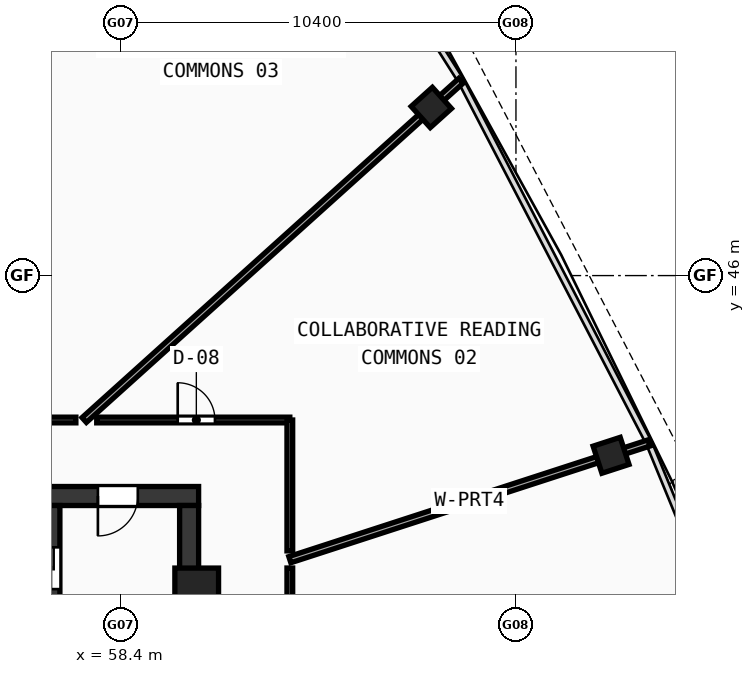
"""IFC4 building model, lengths in metres.
Left out: names, types, materials, properties, quantities, classifications, styles, units other than length and angle.
Written with IfcOpenShell. Run it as: python <this file> out.ifc"""

import sys

from ifc_helpers import new_model, si_unit, direction, frame, frame_2d, origin, origin_with_axes, origin_2d, place, context, subcontext, project, spatial, rectangle, hollow_rectangle, extrude, source, transform, mapped, element, fill, save


model = new_model("IFC4")
c1 = context("Model", 3, precision=1e-05, world=origin(), true_north=direction((0.0, 1.0)))
c2 = subcontext(c1, "Body", "Model", "MODEL_VIEW")
j1 = project(units=[si_unit("LENGTHUNIT", "METRE"), si_unit("PLANEANGLEUNIT", "RADIAN")], contexts=[c1])
p1 = place(None, origin())
s1 = spatial("IfcSite", under=j1, at=p1, CompositionType="ELEMENT")
p2 = place(p1, origin())
s2 = spatial("IfcBuilding", under=s1, at=p2, CompositionType="ELEMENT")
p3 = place(p2, frame((0.0, 0.0, 311.13)))
s3 = spatial("IfcBuildingStorey", under=s2, at=p3, CompositionType="ELEMENT", Elevation=311.13)
p4 = place(p3, frame((49.2, 40.2, 0.0), z_axis=(0.0, 0.0, 1.0), x_axis=(1.0, 0.0, 0.0)))
e1 = element("IfcWall", 1, at=p4, inside=s3, PredefinedType="SHEAR", context=c2, shape_type="SweptSolid", body=[
    extrude(rectangle(XDim=11.25, YDim=0.5, at=frame_2d((5.625, 0.0))), origin(), (0.0, 0.0, 1.0), 3.47),
])
p5 = place(p4, frame((8.6, 0.0, 0.0)))
e2 = element("IfcOpeningElement", 2, at=p5, cuts=e1, PredefinedType="OPENING", context=c2, shape_type="SweptSolid", body=[
    extrude(rectangle(XDim=1.05, YDim=2.1, at=frame_2d((0.525, 1.05))), frame((0.0, 0.26, 0.0), z_axis=(0.0, -1.0, 0.0), x_axis=(1.0, 0.0, 0.0)), (0.0, 0.0, 1.0), 0.52),
])
p6 = place(p3, frame((60.2, 27.75, 0.0), z_axis=(0.0, 0.0, 1.0), x_axis=(0.0, 1.0, 0.0)))
e3 = element("IfcWall", 3, at=p6, inside=s3, PredefinedType="SHEAR", context=c2, shape_type="SweptSolid", body=[
    extrude(rectangle(XDim=12.2, YDim=0.5, at=frame_2d((6.1, 0.0))), origin(), (0.0, 0.0, 1.0), 3.47),
])
p7 = place(p3, frame((56.6, 27.75, 0.0), z_axis=(0.0, 0.0, 1.0), x_axis=(0.0, 1.0, 0.0)))
e4 = element("IfcWall", 4, at=p7, inside=s3, PredefinedType="SHEAR", context=c2, shape_type="SweptSolid", body=[
    extrude(rectangle(XDim=12.2, YDim=0.4, at=frame_2d((6.1, 0.0))), origin(), (0.0, 0.0, 1.0), 3.47),
])
p8 = place(p7, frame((10.0, 0.0, 0.0)))
e5 = element("IfcOpeningElement", 5, at=p8, cuts=e4, PredefinedType="OPENING", context=c2, shape_type="SweptSolid", body=[
    extrude(rectangle(XDim=1.1, YDim=2.1, at=frame_2d((0.55, 1.05))), frame((0.0, 0.21, 0.0), z_axis=(0.0, -1.0, 0.0), x_axis=(1.0, 0.0, 0.0)), (0.0, 0.0, 1.0), 0.42),
])
m1 = source(origin(), c2, "Body", "SweptSolid", [
    extrude(hollow_rectangle(XDim=1.15, YDim=1.15, WallThickness=0.048, at=origin_2d()), origin(), (0.0, 0.0, 1.0), 3.73),
])
p9 = place(p3, frame((60.4, 37.729, -0.26), z_axis=(0.0, 0.0, 1.0), x_axis=(1.0, 0.0, 0.0)))
e6 = element("IfcColumn", 6, at=p9, inside=s3, PredefinedType="COLUMN", context=c2, shape_type="MappedRepresentation", body=[
    mapped(m1, transform((0.0, 0.0, 0.0), scale=1.0)),
])
m2 = source(origin(), c2, "Body", "SweptSolid", [
    extrude(hollow_rectangle(XDim=0.75, YDim=0.75, WallThickness=0.028, at=origin_2d()), origin(), (0.0, 0.0, 1.0), 3.73),
])
for number, where, z_axis, x_axis in (
    (7, (71.302, 41.271, -0.26), (0.0, 0.0, 1.0), (-0.309, 0.951, 0.0)),
    (8, (66.573, 50.424, -0.26), (0.0, 0.0, 1.0), (-0.669, 0.743, 0.0)),
):
    element("IfcColumn", number, at=place(p3, frame(where, z_axis=z_axis, x_axis=x_axis)), inside=s3, PredefinedType="COLUMN", context=c2, shape_type="MappedRepresentation", body=[
        mapped(m2, transform((0.0, 0.0, 0.0), scale=1.0)),
    ])
p10 = place(p3, frame((62.85, 38.525, 0.0), z_axis=(0.0, 0.0, 1.0), x_axis=(0.951056273407, 0.309017741906, 0.0)))
e9 = element("IfcWall", 9, at=p10, inside=s3, PredefinedType="PARTITIONING", context=c2, shape_type="SweptSolid", body=[
    extrude(rectangle(XDim=9.937, YDim=0.17, at=frame_2d((4.969, 0.0))), origin(), (0.0, 0.0, 1.0), 2.87),
])
p11 = place(p3, frame((57.44, 42.2, 0.0), z_axis=(0.0, 0.0, 1.0), x_axis=(0.743143971996, 0.669131554245, 0.0)))
e10 = element("IfcWall", 10, at=p11, inside=s3, PredefinedType="PARTITIONING", context=c2, shape_type="SweptSolid", body=[
    extrude(rectangle(XDim=13.34, YDim=0.17, at=frame_2d((6.67, 0.0))), origin(), (0.0, 0.0, 1.0), 2.87),
])
p12 = place(p3, frame((53.387, 45.8, 0.0), z_axis=(0.0, 0.0, 1.0), x_axis=(0.406746244391, 0.913541182801, 0.0)))
e11 = element("IfcWall", 11, at=p12, inside=s3, PredefinedType="PARTITIONING", context=c2, shape_type="SweptSolid", body=[
    extrude(rectangle(XDim=17.589, YDim=0.17, at=frame_2d((8.794, 0.0))), origin(), (0.0, 0.0, 1.0), 2.87),
])
p13 = place(p3, frame((54.42, 42.2, 0.0), z_axis=(0.0, 0.0, 1.0), x_axis=(1.0, 0.0, 0.0)))
e12 = element("IfcWall", 12, at=p13, inside=s3, PredefinedType="PARTITIONING", context=c2, shape_type="SweptSolid", body=[
    extrude(rectangle(XDim=2.801, YDim=0.15, at=frame_2d((1.4, 0.0))), origin(), (0.0, 0.0, 1.0), 2.87),
])
p14 = place(p13, frame((0.925, 0.0, 0.0)))
e13 = element("IfcOpeningElement", 13, at=p14, cuts=e12, PredefinedType="OPENING", context=c2, shape_type="SweptSolid", body=[
    extrude(rectangle(XDim=0.98, YDim=2.12, at=frame_2d((0.49, 1.06))), frame((0.0, 0.085, 0.0), z_axis=(0.0, -1.0, 0.0), x_axis=(1.0, 0.0, 0.0)), (0.0, 0.0, 1.0), 0.17),
])
p15 = place(p3, frame((57.769, 42.2, 0.0), z_axis=(0.0, 0.0, 1.0), x_axis=(1.0, 0.0, 0.0)))
e14 = element("IfcWall", 14, at=p15, inside=s3, PredefinedType="PARTITIONING", context=c2, shape_type="SweptSolid", body=[
    extrude(rectangle(XDim=5.081, YDim=0.15, at=frame_2d((2.541, 0.0))), origin(), (0.0, 0.0, 1.0), 3.12),
])
p16 = place(p15, frame((2.131, 0.0, 0.0)))
e15 = element("IfcOpeningElement", 15, at=p16, cuts=e14, PredefinedType="OPENING", context=c2, shape_type="SweptSolid", body=[
    extrude(rectangle(XDim=0.98, YDim=2.12, at=frame_2d((0.49, 1.06))), frame((0.0, 0.085, 0.0), z_axis=(0.0, -1.0, 0.0), x_axis=(1.0, 0.0, 0.0)), (0.0, 0.0, 1.0), 0.17),
])
p17 = place(p3, frame((62.85, 42.2, 0.0), z_axis=(0.0, 0.0, 1.0), x_axis=(0.0, -1.0, 0.0)))
e16 = element("IfcWall", 16, at=p17, inside=s3, PredefinedType="PARTITIONING", context=c2, shape_type="SweptSolid", body=[
    extrude(rectangle(XDim=3.444, YDim=0.15, at=frame_2d((1.722, 0.0))), origin(), (0.0, 0.0, 1.0), 3.12),
])
p18 = place(p3, frame((62.85, 38.305, 0.0), z_axis=(0.0, 0.0, 1.0), x_axis=(0.0, -1.0, 0.0)))
e17 = element("IfcWall", 17, at=p18, inside=s3, PredefinedType="PARTITIONING", context=c2, shape_type="SweptSolid", body=[
    extrude(rectangle(XDim=7.004, YDim=0.15, at=frame_2d((3.502, 0.0))), origin(), (0.0, 0.0, 1.0), 3.47),
])
p19 = place(p18, frame((3.027, 0.0, 0.0)))
e18 = element("IfcOpeningElement", 18, at=p19, cuts=e17, PredefinedType="OPENING", context=c2, shape_type="SweptSolid", body=[
    extrude(rectangle(XDim=0.98, YDim=2.12, at=frame_2d((0.49, 1.06))), frame((0.0, 0.085, 0.0), z_axis=(0.0, -1.0, 0.0), x_axis=(1.0, 0.0, 0.0)), (0.0, 0.0, 1.0), 0.17),
])
m3 = source(origin(), c2, "Body", "SweptSolid", [
    extrude(rectangle(XDim=1.05, YDim=2.1, at=frame_2d((0.525, 1.05))), frame((0.0, 0.025, 0.0), z_axis=(0.0, -1.0, 0.0), x_axis=(1.0, 0.0, 0.0)), (0.0, 0.0, 1.0), 0.05),
])
p20 = place(p5, frame((1.05, 0.0, 0.0), z_axis=(0.0, 0.0, 1.0), x_axis=(-1.0, 0.0, 0.0)))
e19 = element("IfcDoor", 19, at=p20, inside=s3, OperationType="SINGLE_SWING_RIGHT", PredefinedType="DOOR", context=c2, shape_type="MappedRepresentation", body=[
    mapped(m3, transform((0.0, 0.0, 0.0), scale=1.0)),
])
fill(e2, e19)
m4 = source(origin(), c2, "Body", "SweptSolid", [
    extrude(rectangle(XDim=1.1, YDim=2.1, at=frame_2d((0.55, 1.05))), frame((0.0, 0.025, 0.0), z_axis=(0.0, -1.0, 0.0), x_axis=(1.0, 0.0, 0.0)), (0.0, 0.0, 1.0), 0.05),
])
p21 = place(p8, origin_with_axes())
e20 = element("IfcDoor", 20, at=p21, inside=s3, OperationType="DOUBLE_DOOR_SLIDING", PredefinedType="DOOR", context=c2, shape_type="MappedRepresentation", body=[
    mapped(m4, transform((0.0, 0.0, 0.0), scale=1.0)),
])
fill(e5, e20)
m5 = source(origin(), c2, "Body", "SweptSolid", [
    extrude(rectangle(XDim=0.98, YDim=2.12, at=frame_2d((0.49, 1.06))), frame((0.0, 0.025, 0.0), z_axis=(0.0, -1.0, 0.0), x_axis=(1.0, 0.0, 0.0)), (0.0, 0.0, 1.0), 0.05),
])
p22 = place(p16, origin_with_axes())
e21 = element("IfcDoor", 21, at=p22, inside=s3, OperationType="SINGLE_SWING_LEFT", PredefinedType="DOOR", context=c2, shape_type="MappedRepresentation", body=[
    mapped(m5, transform((0.0, 0.0, 0.0), scale=1.0)),
])
fill(e15, e21)
save(model, sys.argv[1])
